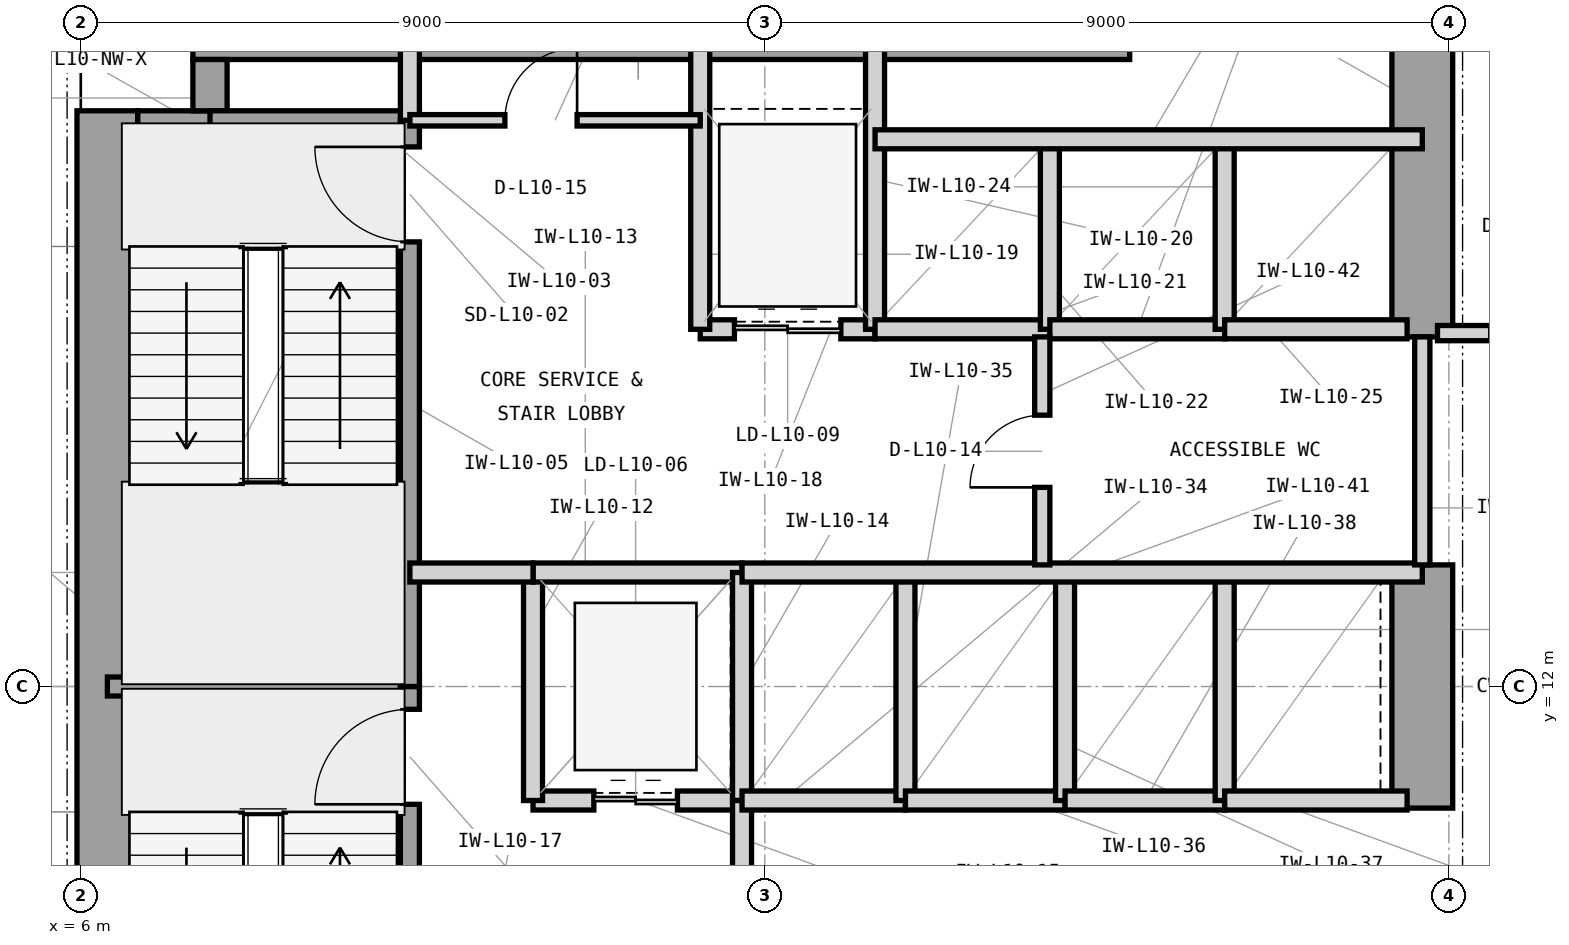
"""IFC4 building model, lengths in metres.
Left out: names, types, materials, properties, quantities, classifications, styles, units other than length and angle.
Written with IfcOpenShell. Run it as: python <this file> out.ifc"""

import sys

from ifc_helpers import new_model, si_unit, direction, frame, frame_2d, origin, place, context, subcontext, project, spatial, rectangle, extrude, element, fill, save


model = new_model("IFC4")
c1 = context("Model", 3, precision=1e-05, world=origin(), true_north=direction((0.0, 1.0)))
c2 = subcontext(c1, "Body", "Model", "MODEL_VIEW")
j1 = project(units=[si_unit("LENGTHUNIT", "METRE"), si_unit("PLANEANGLEUNIT", "RADIAN")], contexts=[c1])
p1 = place(None, origin())
s1 = spatial("IfcSite", under=j1, at=p1, CompositionType="ELEMENT")
p2 = place(p1, origin())
s2 = spatial("IfcBuilding", under=s1, at=p2, CompositionType="ELEMENT")
p3 = place(p2, frame((0.0, 0.0, 46.8)))
s3 = spatial("IfcBuildingStorey", under=s2, at=p3, CompositionType="ELEMENT", Elevation=46.8)
p4 = place(p3, frame((6.35, 4.425, 0.0), z_axis=(0.0, 0.0, 1.0), x_axis=(0.0, 1.0, 0.0)))
e1 = element("IfcWall", 1, at=p4, inside=s3, PredefinedType="SHEAR", context=c2, shape_type="SweptSolid", body=[
    extrude(rectangle(XDim=15.15, YDim=0.8, at=frame_2d((7.575, 0.0))), origin(), (0.0, 0.0, 1.0), 4.2),
])
p5 = place(p3, frame((7.475, 20.65, 0.0), z_axis=(0.0, 0.0, 1.0), x_axis=(1.0, 0.0, 0.0)))
e2 = element("IfcWall", 2, at=p5, inside=s3, PredefinedType="SHEAR", context=c2, shape_type="SweptSolid", body=[
    extrude(rectangle(XDim=12.325, YDim=0.8, at=frame_2d((6.163, 0.0))), origin(), (0.0, 0.0, 1.0), 4.2),
])
p6 = place(p3, frame((23.65, 10.4, 0.0), z_axis=(0.0, 0.0, 1.0), x_axis=(0.0, 1.0, 0.0)))
e3 = element("IfcWall", 3, at=p6, inside=s3, PredefinedType="SHEAR", context=c2, shape_type="SweptSolid", body=[
    extrude(rectangle(XDim=3.2, YDim=0.8, at=frame_2d((1.6, 0.0))), origin(), (0.0, 0.0, 1.0), 4.2),
])
p7 = place(p3, frame((23.65, 16.6, 0.0), z_axis=(0.0, 0.0, 1.0), x_axis=(0.0, 1.0, 0.0)))
e4 = element("IfcWall", 4, at=p7, inside=s3, PredefinedType="SHEAR", context=c2, shape_type="SweptSolid", body=[
    extrude(rectangle(XDim=4.05, YDim=0.8, at=frame_2d((2.025, 0.0))), origin(), (0.0, 0.0, 1.0), 4.2),
])
p8 = place(p3, frame((6.75, 19.35, 0.0), z_axis=(0.0, 0.0, 1.0), x_axis=(1.0, 0.0, 0.0)))
e5 = element("IfcWall", 5, at=p8, inside=s3, PredefinedType="SHEAR", context=c2, shape_type="SweptSolid", body=[
    extrude(rectangle(XDim=1.175, YDim=0.45, at=frame_2d((0.587, 0.0))), origin(), (0.0, 0.0, 1.0), 4.2),
])
p9 = place(p3, frame((7.7, 19.575, 0.0), z_axis=(0.0, 0.0, 1.0), x_axis=(0.0, 1.0, 0.0)))
e6 = element("IfcWall", 6, at=p9, inside=s3, PredefinedType="SHEAR", context=c2, shape_type="SweptSolid", body=[
    extrude(rectangle(XDim=0.675, YDim=0.45, at=frame_2d((0.337, 0.0))), origin(), (0.0, 0.0, 1.0), 4.2),
])
p10 = place(p3, frame((6.35, 12.0, 0.0), z_axis=(0.0, 0.0, 1.0), x_axis=(1.0, 0.0, 0.0)))
e7 = element("IfcWall", 7, at=p10, inside=s3, PredefinedType="SHEAR", context=c2, shape_type="SweptSolid", body=[
    extrude(rectangle(XDim=4.105, YDim=0.25, at=frame_2d((2.052, 0.0))), origin(), (0.0, 0.0, 1.0), 4.2),
])
p11 = place(p3, frame((7.7, 19.45, 0.0), z_axis=(0.0, 0.0, 1.0), x_axis=(1.0, 0.0, 0.0)))
e8 = element("IfcWall", 8, at=p11, inside=s3, PredefinedType="SHEAR", context=c2, shape_type="SweptSolid", body=[
    extrude(rectangle(XDim=2.755, YDim=0.25, at=frame_2d((1.377, 0.0))), origin(), (0.0, 0.0, 1.0), 4.2),
])
p12 = place(p3, frame((10.33, 4.55, 0.0), z_axis=(0.0, 0.0, 1.0), x_axis=(0.0, 1.0, 0.0)))
e9 = element("IfcWall", 9, at=p12, inside=s3, PredefinedType="SHEAR", context=c2, shape_type="SweptSolid", body=[
    extrude(rectangle(XDim=7.45, YDim=0.25, at=frame_2d((3.725, 0.0))), origin(), (0.0, 0.0, 1.0), 4.2),
])
p13 = place(p12, frame((5.9, 0.0, 0.0)))
e10 = element("IfcOpeningElement", 10, at=p13, cuts=e9, PredefinedType="OPENING", context=c2, shape_type="SweptSolid", body=[
    extrude(rectangle(XDim=1.25, YDim=2.2, at=frame_2d((0.625, 1.1))), frame((0.0, 0.135, 0.0), z_axis=(0.0, -1.0, 0.0), x_axis=(1.0, 0.0, 0.0)), (0.0, 0.0, 1.0), 0.27),
])
p14 = place(p3, frame((10.33, 12.0, 0.0), z_axis=(0.0, 0.0, 1.0), x_axis=(0.0, 1.0, 0.0)))
e11 = element("IfcWall", 11, at=p14, inside=s3, PredefinedType="SHEAR", context=c2, shape_type="SweptSolid", body=[
    extrude(rectangle(XDim=7.45, YDim=0.25, at=frame_2d((3.725, 0.0))), origin(), (0.0, 0.0, 1.0), 4.2),
])
p15 = place(p14, frame((5.85, 0.0, 0.0)))
e12 = element("IfcOpeningElement", 12, at=p15, cuts=e11, PredefinedType="OPENING", context=c2, shape_type="SweptSolid", body=[
    extrude(rectangle(XDim=1.25, YDim=2.2, at=frame_2d((0.625, 1.1))), frame((0.0, 0.135, 0.0), z_axis=(0.0, -1.0, 0.0), x_axis=(1.0, 0.0, 0.0)), (0.0, 0.0, 1.0), 0.27),
])
p16 = place(p3, frame((10.33, 19.45, 0.0), z_axis=(0.0, 0.0, 1.0), x_axis=(0.0, 1.0, 0.0)))
e13 = element("IfcWall", 13, at=p16, inside=s3, PredefinedType="PARTITIONING", context=c2, shape_type="SweptSolid", body=[
    extrude(rectangle(XDim=1.2, YDim=0.25, at=frame_2d((0.6, 0.0))), origin(), (0.0, 0.0, 1.0), 3.114),
])
p17 = place(p3, frame((11.95, 10.5, 0.0), z_axis=(0.0, 0.0, 1.0), x_axis=(1.0, 0.0, 0.0)))
e14 = element("IfcWall", 14, at=p17, inside=s3, PredefinedType="PARTITIONING", context=c2, shape_type="SweptSolid", body=[
    extrude(rectangle(XDim=2.75, YDim=0.25, at=frame_2d((1.375, 0.0))), origin(), (0.0, 0.0, 1.0), 3.426),
])
p18 = place(p17, frame((0.8, 0.0, 0.0)))
e15 = element("IfcOpeningElement", 15, at=p18, cuts=e14, PredefinedType="OPENING", context=c2, shape_type="SweptSolid", body=[
    extrude(rectangle(XDim=1.1, YDim=2.25, at=frame_2d((0.55, 1.125))), frame((0.0, 0.135, 0.0), z_axis=(0.0, -1.0, 0.0), x_axis=(1.0, 0.0, 0.0)), (0.0, 0.0, 1.0), 0.27),
])
p19 = place(p3, frame((11.95, 10.5, 0.0), z_axis=(0.0, 0.0, 1.0), x_axis=(0.0, 1.0, 0.0)))
e16 = element("IfcWall", 16, at=p19, inside=s3, PredefinedType="PARTITIONING", context=c2, shape_type="SweptSolid", body=[
    extrude(rectangle(XDim=3.0, YDim=0.25, at=frame_2d((1.5, 0.0))), origin(), (0.0, 0.0, 1.0), 3.97),
])
p20 = place(p3, frame((11.95, 13.5, 0.0), z_axis=(0.0, 0.0, 1.0), x_axis=(1.0, 0.0, 0.0)))
e17 = element("IfcWall", 17, at=p20, inside=s3, PredefinedType="PARTITIONING", context=c2, shape_type="SweptSolid", body=[
    extrude(rectangle(XDim=2.75, YDim=0.25, at=frame_2d((1.375, 0.0))), origin(), (0.0, 0.0, 1.0), 3.426),
])
p21 = place(p3, frame((14.7, 10.5, 0.0), z_axis=(0.0, 0.0, 1.0), x_axis=(0.0, 1.0, 0.0)))
e18 = element("IfcWall", 18, at=p21, inside=s3, PredefinedType="PARTITIONING", context=c2, shape_type="SweptSolid", body=[
    extrude(rectangle(XDim=3.0, YDim=0.25, at=frame_2d((1.5, 0.0))), origin(), (0.0, 0.0, 1.0), 3.97),
])
p22 = place(p3, frame((14.7, 6.7, 0.0), z_axis=(0.0, 0.0, 1.0), x_axis=(0.0, 1.0, 0.0)))
e19 = element("IfcWall", 19, at=p22, inside=s3, PredefinedType="PARTITIONING", context=c2, shape_type="SweptSolid", body=[
    extrude(rectangle(XDim=3.8, YDim=0.25, at=frame_2d((1.9, 0.0))), origin(), (0.0, 0.0, 1.0), 3.97),
])
p23 = place(p22, frame((1.3, 0.0, 0.0)))
e20 = element("IfcOpeningElement", 20, at=p23, cuts=e19, PredefinedType="OPENING", context=c2, shape_type="SweptSolid", body=[
    extrude(rectangle(XDim=1.2, YDim=2.2, at=frame_2d((0.6, 1.1))), frame((0.0, 0.135, 0.0), z_axis=(0.0, -1.0, 0.0), x_axis=(1.0, 0.0, 0.0)), (0.0, 0.0, 1.0), 0.27),
])
p24 = place(p3, frame((10.33, 13.5, 0.0), z_axis=(0.0, 0.0, 1.0), x_axis=(1.0, 0.0, 0.0)))
e21 = element("IfcWall", 21, at=p24, inside=s3, PredefinedType="PARTITIONING", context=c2, shape_type="SweptSolid", body=[
    extrude(rectangle(XDim=1.62, YDim=0.25, at=frame_2d((0.81, 0.0))), origin(), (0.0, 0.0, 1.0), 3.426),
])
p25 = place(p3, frame((14.15, 16.7, 0.0), z_axis=(0.0, 0.0, 1.0), x_axis=(1.0, 0.0, 0.0)))
e22 = element("IfcWall", 22, at=p25, inside=s3, PredefinedType="PARTITIONING", context=c2, shape_type="SweptSolid", body=[
    extrude(rectangle(XDim=2.3, YDim=0.25, at=frame_2d((1.15, 0.0))), origin(), (0.0, 0.0, 1.0), 3.426),
])
p26 = place(p25, frame((0.45, 0.0, 0.0)))
e23 = element("IfcOpeningElement", 23, at=p26, cuts=e22, PredefinedType="OPENING", context=c2, shape_type="SweptSolid", body=[
    extrude(rectangle(XDim=1.4, YDim=2.35, at=frame_2d((0.7, 1.175))), frame((0.0, 0.135, 0.0), z_axis=(0.0, -1.0, 0.0), x_axis=(1.0, 0.0, 0.0)), (0.0, 0.0, 1.0), 0.27),
])
for number, where, z_axis, x_axis in (
    (24, (14.15, 16.7, 0.0), (0.0, 0.0, 1.0), (0.0, 1.0, 0.0)),
    (25, (16.45, 16.7, 0.0), (0.0, 0.0, 1.0), (0.0, 1.0, 0.0)),
):
    element("IfcWall", number, at=place(p3, frame(where, z_axis=z_axis, x_axis=x_axis)), inside=s3, PredefinedType="PARTITIONING", context=c2, shape_type="SweptSolid", body=[
        extrude(rectangle(XDim=3.95, YDim=0.25, at=frame_2d((1.975, 0.0))), origin(), (0.0, 0.0, 1.0), 3.97),
    ])
p27 = place(p3, frame((16.45, 16.7, 0.0), z_axis=(0.0, 0.0, 1.0), x_axis=(1.0, 0.0, 0.0)))
e26 = element("IfcWall", 26, at=p27, inside=s3, PredefinedType="PARTITIONING", context=c2, shape_type="SweptSolid", body=[
    extrude(rectangle(XDim=2.3, YDim=0.25, at=frame_2d((1.15, 0.0))), origin(), (0.0, 0.0, 1.0), 3.426),
])
p28 = place(p3, frame((18.75, 16.7, 0.0), z_axis=(0.0, 0.0, 1.0), x_axis=(0.0, 1.0, 0.0)))
e27 = element("IfcWall", 27, at=p28, inside=s3, PredefinedType="PARTITIONING", context=c2, shape_type="SweptSolid", body=[
    extrude(rectangle(XDim=2.5, YDim=0.25, at=frame_2d((1.25, 0.0))), origin(), (0.0, 0.0, 1.0), 3.97),
])
p29 = place(p3, frame((18.75, 16.7, 0.0), z_axis=(0.0, 0.0, 1.0), x_axis=(1.0, 0.0, 0.0)))
e28 = element("IfcWall", 28, at=p29, inside=s3, PredefinedType="PARTITIONING", context=c2, shape_type="SweptSolid", body=[
    extrude(rectangle(XDim=2.3, YDim=0.25, at=frame_2d((1.15, 0.0))), origin(), (0.0, 0.0, 1.0), 3.426),
])
p30 = place(p3, frame((21.05, 16.7, 0.0), z_axis=(0.0, 0.0, 1.0), x_axis=(0.0, 1.0, 0.0)))
e29 = element("IfcWall", 29, at=p30, inside=s3, PredefinedType="PARTITIONING", context=c2, shape_type="SweptSolid", body=[
    extrude(rectangle(XDim=2.5, YDim=0.25, at=frame_2d((1.25, 0.0))), origin(), (0.0, 0.0, 1.0), 3.97),
])
p31 = place(p3, frame((21.05, 16.7, 0.0), z_axis=(0.0, 0.0, 1.0), x_axis=(1.0, 0.0, 0.0)))
e30 = element("IfcWall", 30, at=p31, inside=s3, PredefinedType="PARTITIONING", context=c2, shape_type="SweptSolid", body=[
    extrude(rectangle(XDim=2.4, YDim=0.25, at=frame_2d((1.2, 0.0))), origin(), (0.0, 0.0, 1.0), 3.426),
])
p32 = place(p3, frame((16.45, 19.2, 0.0), z_axis=(0.0, 0.0, 1.0), x_axis=(1.0, 0.0, 0.0)))
e31 = element("IfcWall", 31, at=p32, inside=s3, PredefinedType="PARTITIONING", context=c2, shape_type="SweptSolid", body=[
    extrude(rectangle(XDim=7.2, YDim=0.25, at=frame_2d((3.6, 0.0))), origin(), (0.0, 0.0, 1.0), 3.97),
])
p33 = place(p3, frame((14.7, 10.5, 0.0), z_axis=(0.0, 0.0, 1.0), x_axis=(1.0, 0.0, 0.0)))
e32 = element("IfcWall", 32, at=p33, inside=s3, PredefinedType="PARTITIONING", context=c2, shape_type="SweptSolid", body=[
    extrude(rectangle(XDim=2.15, YDim=0.25, at=frame_2d((1.075, 0.0))), origin(), (0.0, 0.0, 1.0), 3.426),
])
p34 = place(p3, frame((16.85, 10.5, 0.0), z_axis=(0.0, 0.0, 1.0), x_axis=(0.0, 1.0, 0.0)))
e33 = element("IfcWall", 33, at=p34, inside=s3, PredefinedType="PARTITIONING", context=c2, shape_type="SweptSolid", body=[
    extrude(rectangle(XDim=3.0, YDim=0.25, at=frame_2d((1.5, 0.0))), origin(), (0.0, 0.0, 1.0), 3.97),
])
p35 = place(p3, frame((16.85, 10.5, 0.0), z_axis=(0.0, 0.0, 1.0), x_axis=(1.0, 0.0, 0.0)))
e34 = element("IfcWall", 34, at=p35, inside=s3, PredefinedType="PARTITIONING", context=c2, shape_type="SweptSolid", body=[
    extrude(rectangle(XDim=2.1, YDim=0.25, at=frame_2d((1.05, 0.0))), origin(), (0.0, 0.0, 1.0), 3.426),
])
p36 = place(p3, frame((18.95, 10.5, 0.0), z_axis=(0.0, 0.0, 1.0), x_axis=(0.0, 1.0, 0.0)))
e35 = element("IfcWall", 35, at=p36, inside=s3, PredefinedType="PARTITIONING", context=c2, shape_type="SweptSolid", body=[
    extrude(rectangle(XDim=3.0, YDim=0.25, at=frame_2d((1.5, 0.0))), origin(), (0.0, 0.0, 1.0), 3.97),
])
p37 = place(p3, frame((18.95, 10.5, 0.0), z_axis=(0.0, 0.0, 1.0), x_axis=(1.0, 0.0, 0.0)))
e36 = element("IfcWall", 36, at=p37, inside=s3, PredefinedType="PARTITIONING", context=c2, shape_type="SweptSolid", body=[
    extrude(rectangle(XDim=2.1, YDim=0.25, at=frame_2d((1.05, 0.0))), origin(), (0.0, 0.0, 1.0), 3.426),
])
p38 = place(p3, frame((21.05, 10.5, 0.0), z_axis=(0.0, 0.0, 1.0), x_axis=(0.0, 1.0, 0.0)))
e37 = element("IfcWall", 37, at=p38, inside=s3, PredefinedType="PARTITIONING", context=c2, shape_type="SweptSolid", body=[
    extrude(rectangle(XDim=3.0, YDim=0.25, at=frame_2d((1.5, 0.0))), origin(), (0.0, 0.0, 1.0), 3.97),
])
p39 = place(p3, frame((21.05, 10.5, 0.0), z_axis=(0.0, 0.0, 1.0), x_axis=(1.0, 0.0, 0.0)))
e38 = element("IfcWall", 38, at=p39, inside=s3, PredefinedType="PARTITIONING", context=c2, shape_type="SweptSolid", body=[
    extrude(rectangle(XDim=2.4, YDim=0.25, at=frame_2d((1.2, 0.0))), origin(), (0.0, 0.0, 1.0), 3.426),
])
p40 = place(p3, frame((14.7, 13.5, 0.0), z_axis=(0.0, 0.0, 1.0), x_axis=(1.0, 0.0, 0.0)))
e39 = element("IfcWall", 39, at=p40, inside=s3, PredefinedType="PARTITIONING", context=c2, shape_type="SweptSolid", body=[
    extrude(rectangle(XDim=8.95, YDim=0.25, at=frame_2d((4.475, 0.0))), origin(), (0.0, 0.0, 1.0), 3.426),
])
p41 = place(p3, frame((18.65, 13.6, 0.0), z_axis=(0.0, 0.0, 1.0), x_axis=(0.0, 1.0, 0.0)))
e40 = element("IfcWall", 40, at=p41, inside=s3, PredefinedType="PARTITIONING", context=c2, shape_type="SweptSolid", body=[
    extrude(rectangle(XDim=3.0, YDim=0.2, at=frame_2d((1.5, 0.0))), origin(), (0.0, 0.0, 1.0), 3.97),
])
p42 = place(p41, frame((1.02, 0.0, 0.0)))
e41 = element("IfcOpeningElement", 41, at=p42, cuts=e40, PredefinedType="OPENING", context=c2, shape_type="SweptSolid", body=[
    extrude(rectangle(XDim=0.95, YDim=2.1, at=frame_2d((0.475, 1.05))), frame((0.0, 0.11, 0.0), z_axis=(0.0, -1.0, 0.0), x_axis=(1.0, 0.0, 0.0)), (0.0, 0.0, 1.0), 0.22),
])
p43 = place(p3, frame((23.65, 13.6, 0.0), z_axis=(0.0, 0.0, 1.0), x_axis=(0.0, 1.0, 0.0)))
e42 = element("IfcWall", 42, at=p43, inside=s3, PredefinedType="PARTITIONING", context=c2, shape_type="SweptSolid", body=[
    extrude(rectangle(XDim=3.0, YDim=0.2, at=frame_2d((1.5, 0.0))), origin(), (0.0, 0.0, 1.0), 3.97),
])
p44 = place(p3, frame((10.33, 19.45, 0.0), z_axis=(0.0, 0.0, 1.0), x_axis=(1.0, 0.0, 0.0)))
e43 = element("IfcWall", 43, at=p44, inside=s3, PredefinedType="PARTITIONING", context=c2, shape_type="SweptSolid", body=[
    extrude(rectangle(XDim=3.82, YDim=0.15, at=frame_2d((1.91, 0.0))), origin(), (0.0, 0.0, 1.0), 3.97),
])
p45 = place(p44, frame((1.25, 0.0, 0.0)))
e44 = element("IfcOpeningElement", 44, at=p45, cuts=e43, PredefinedType="OPENING", context=c2, shape_type="SweptSolid", body=[
    extrude(rectangle(XDim=0.95, YDim=2.1, at=frame_2d((0.475, 1.05))), frame((0.0, 0.085, 0.0), z_axis=(0.0, -1.0, 0.0), x_axis=(1.0, 0.0, 0.0)), (0.0, 0.0, 1.0), 0.17),
])
p46 = place(p3, frame((23.85, 16.65, 0.0), z_axis=(0.0, 0.0, 1.0), x_axis=(1.0, 0.0, 0.0)))
e45 = element("IfcWall", 45, at=p46, inside=s3, PredefinedType="PARTITIONING", context=c2, shape_type="SweptSolid", body=[
    extrude(rectangle(XDim=2.85, YDim=0.2, at=frame_2d((1.425, 0.0))), origin(), (0.0, 0.0, 1.0), 3.97),
])
p47 = place(p46, frame((0.7, 0.0, 0.0)))
e46 = element("IfcOpeningElement", 46, at=p47, cuts=e45, PredefinedType="OPENING", context=c2, shape_type="SweptSolid", body=[
    extrude(rectangle(XDim=1.0, YDim=2.15, at=frame_2d((0.5, 1.075))), frame((0.0, 0.11, 0.0), z_axis=(0.0, -1.0, 0.0), x_axis=(1.0, 0.0, 0.0)), (0.0, 0.0, 1.0), 0.22),
])
p48 = place(p13, origin())
e47 = element("IfcDoor", 47, at=p48, inside=s3, OperationType="SINGLE_SWING_LEFT", PredefinedType="DOOR", context=c2, shape_type="SweptSolid", body=[
    extrude(rectangle(XDim=1.25, YDim=2.2, at=frame_2d((0.625, 1.1))), frame((0.0, 0.025, 0.0), z_axis=(0.0, -1.0, 0.0), x_axis=(1.0, 0.0, 0.0)), (0.0, 0.0, 1.0), 0.05),
])
fill(e10, e47)
p49 = place(p15, origin())
e48 = element("IfcDoor", 48, at=p49, inside=s3, OperationType="SINGLE_SWING_RIGHT", PredefinedType="DOOR", context=c2, shape_type="SweptSolid", body=[
    extrude(rectangle(XDim=1.25, YDim=2.2, at=frame_2d((0.625, 1.1))), frame((0.0, 0.025, 0.0), z_axis=(0.0, -1.0, 0.0), x_axis=(1.0, 0.0, 0.0)), (0.0, 0.0, 1.0), 0.05),
])
fill(e12, e48)
p50 = place(p18, origin())
e49 = element("IfcDoor", 49, at=p50, inside=s3, OperationType="DOUBLE_DOOR_SLIDING", PredefinedType="DOOR", context=c2, shape_type="SweptSolid", body=[
    extrude(rectangle(XDim=1.1, YDim=2.25, at=frame_2d((0.55, 1.125))), frame((0.0, 0.025, 0.0), z_axis=(0.0, -1.0, 0.0), x_axis=(1.0, 0.0, 0.0)), (0.0, 0.0, 1.0), 0.05),
])
fill(e15, e49)
p51 = place(p26, origin())
e50 = element("IfcDoor", 50, at=p51, inside=s3, OperationType="DOUBLE_DOOR_SLIDING", PredefinedType="DOOR", context=c2, shape_type="SweptSolid", body=[
    extrude(rectangle(XDim=1.4, YDim=2.35, at=frame_2d((0.7, 1.175))), frame((0.0, 0.025, 0.0), z_axis=(0.0, -1.0, 0.0), x_axis=(1.0, 0.0, 0.0)), (0.0, 0.0, 1.0), 0.05),
])
fill(e23, e50)
p52 = place(p42, origin())
e51 = element("IfcDoor", 51, at=p52, inside=s3, OperationType="SINGLE_SWING_LEFT", PredefinedType="DOOR", context=c2, shape_type="SweptSolid", body=[
    extrude(rectangle(XDim=0.95, YDim=2.1, at=frame_2d((0.475, 1.05))), frame((0.0, 0.025, 0.0), z_axis=(0.0, -1.0, 0.0), x_axis=(1.0, 0.0, 0.0)), (0.0, 0.0, 1.0), 0.05),
])
fill(e41, e51)
p53 = place(p45, origin())
e52 = element("IfcDoor", 52, at=p53, inside=s3, OperationType="SINGLE_SWING_RIGHT", PredefinedType="DOOR", context=c2, shape_type="SweptSolid", body=[
    extrude(rectangle(XDim=0.95, YDim=2.1, at=frame_2d((0.475, 1.05))), frame((0.0, 0.025, 0.0), z_axis=(0.0, -1.0, 0.0), x_axis=(1.0, 0.0, 0.0)), (0.0, 0.0, 1.0), 0.05),
])
fill(e44, e52)
save(model, sys.argv[1])
